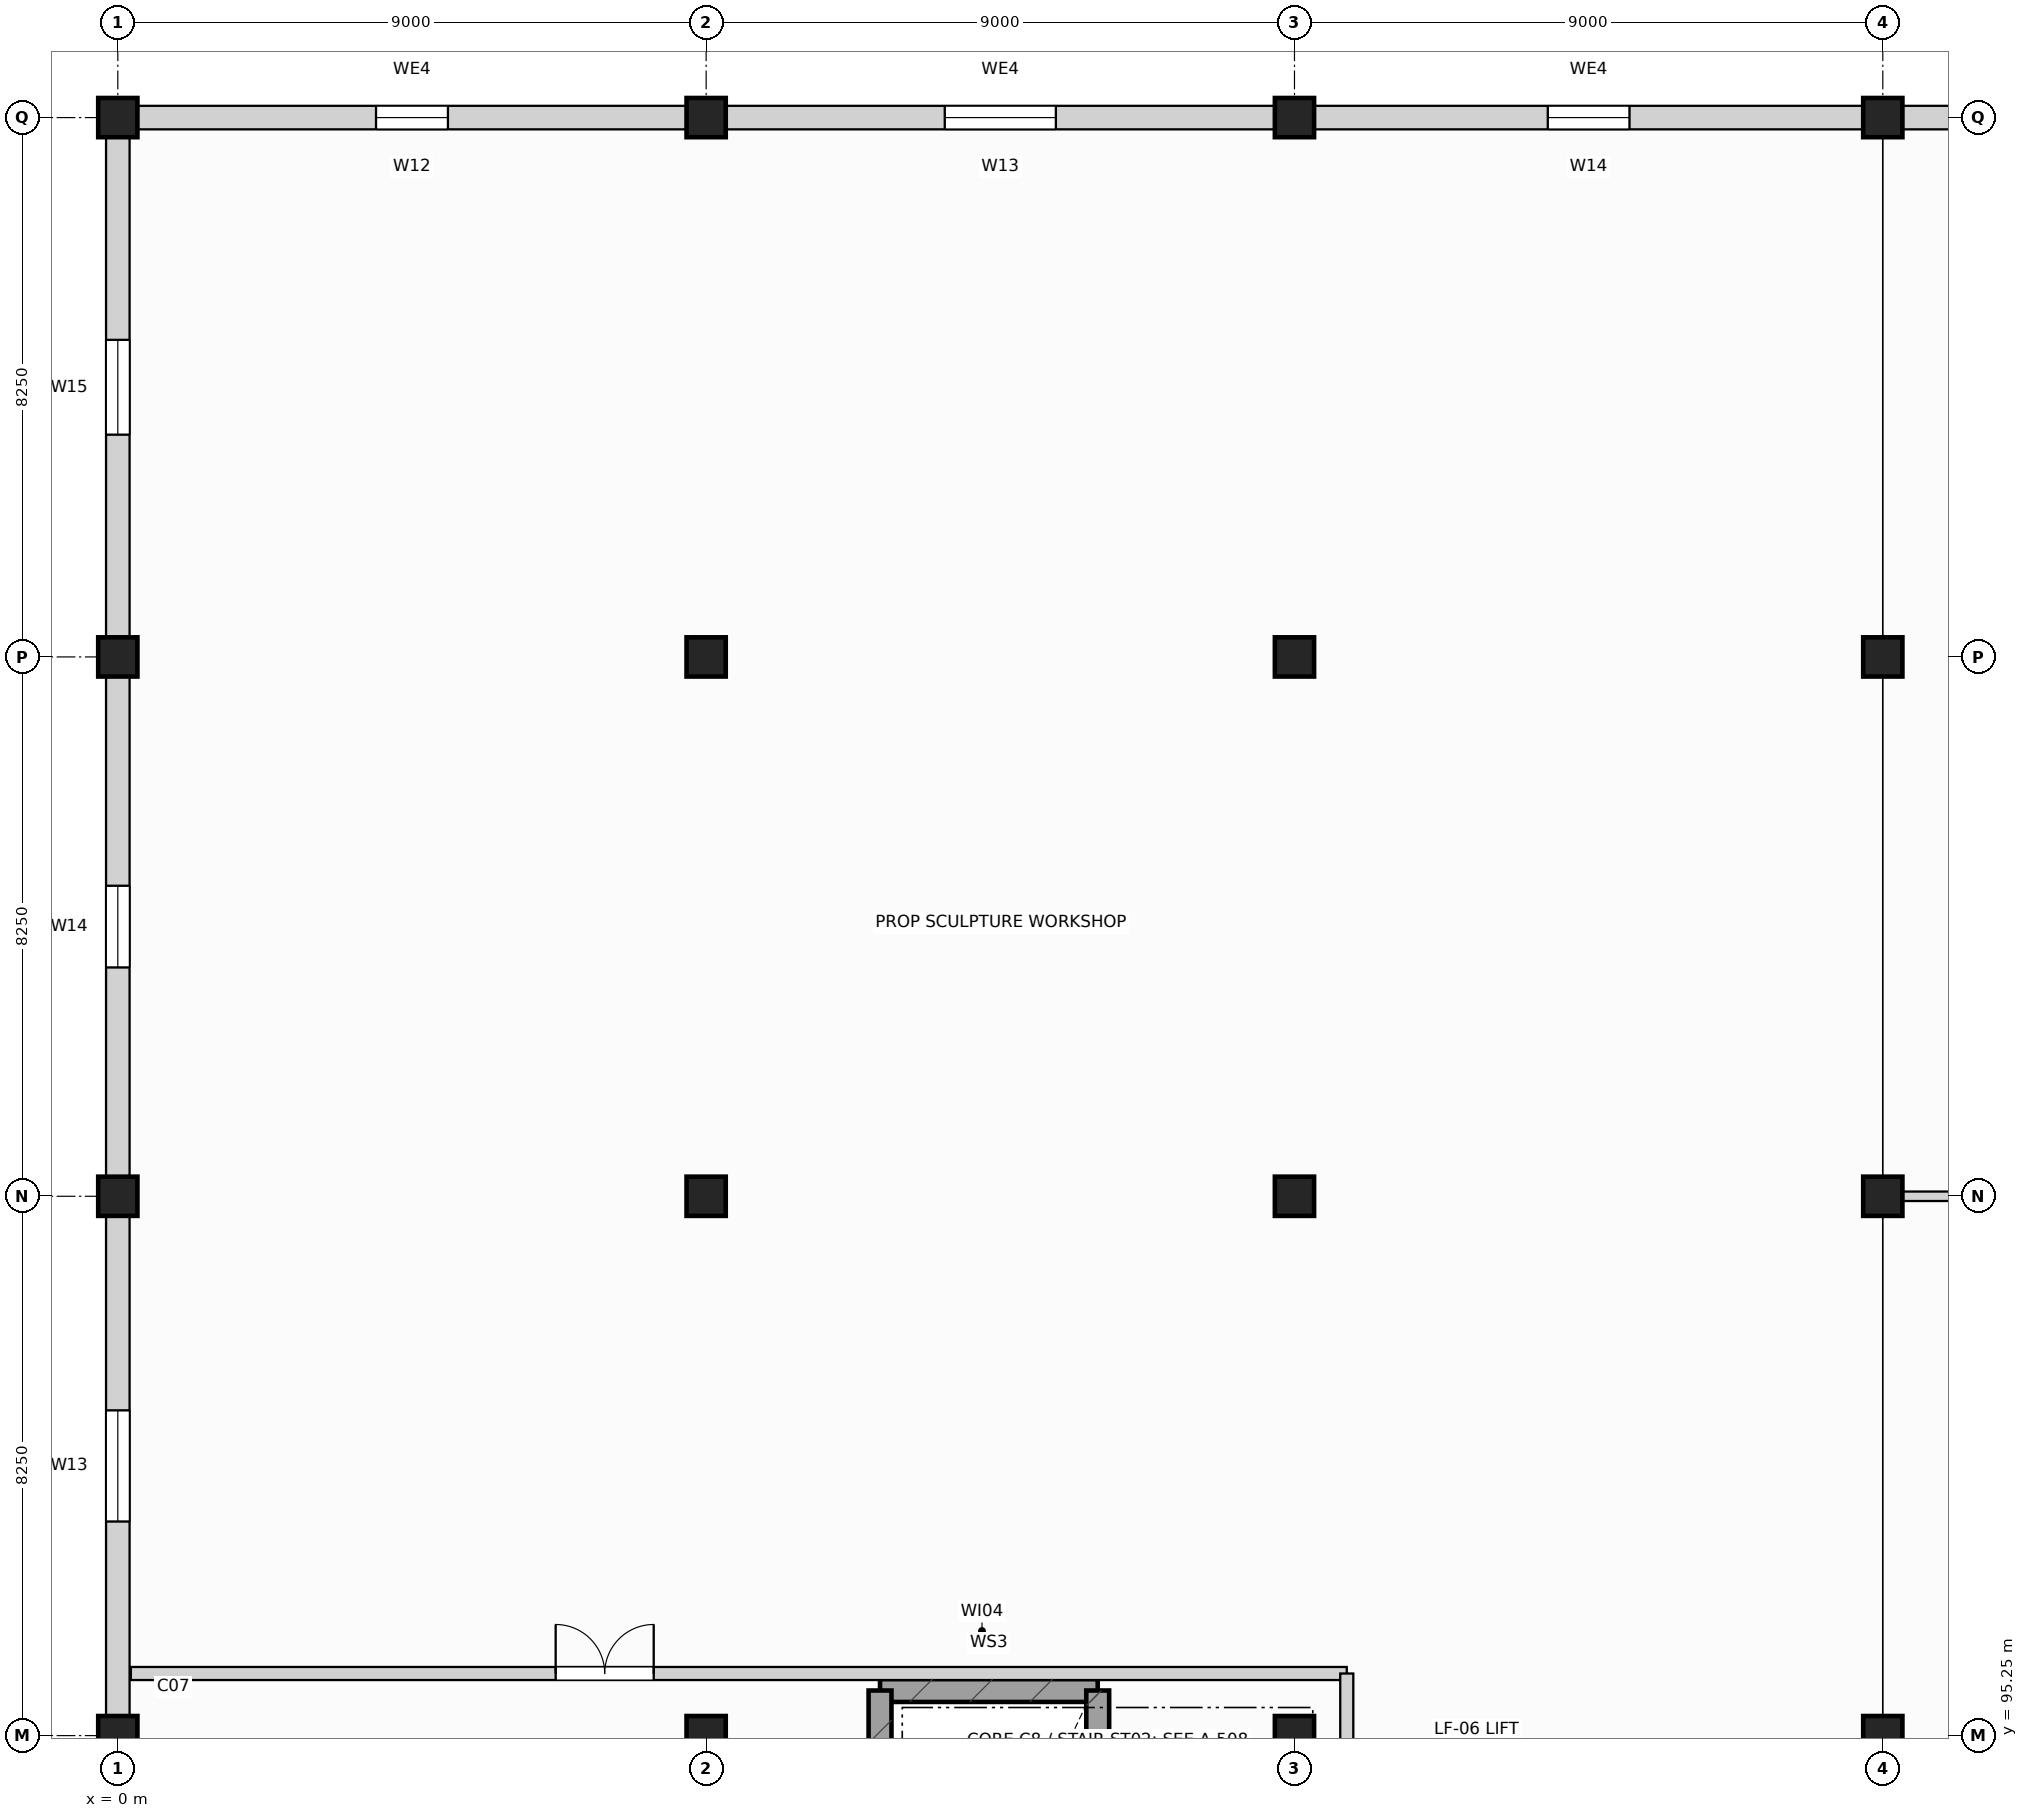
"""IFC4 building model, lengths in metres.
Left out: names, types, materials, properties, quantities, classifications, styles, units other than length and angle.
Written with IfcOpenShell. Run it as: python <this file> out.ifc"""

import sys

from ifc_helpers import new_model, si_unit, direction, frame, frame_2d, origin, origin_2d, place, context, subcontext, project, spatial, rectangle, extrude, element, fill, save


model = new_model("IFC4")
c1 = context("Model", 3, precision=1e-05, world=origin(), true_north=direction((0.0, 1.0)))
c2 = subcontext(c1, "Body", "Model", "MODEL_VIEW")
j1 = project(units=[si_unit("LENGTHUNIT", "METRE"), si_unit("PLANEANGLEUNIT", "RADIAN")], contexts=[c1])
p1 = place(None, origin())
s1 = spatial("IfcSite", under=j1, at=p1, CompositionType="ELEMENT")
p2 = place(p1, origin())
s2 = spatial("IfcBuilding", under=s1, at=p2, CompositionType="ELEMENT")
p3 = place(p2, origin())
s3 = spatial("IfcBuildingStorey", under=s2, at=p3, CompositionType="ELEMENT", Elevation=0.0)
for number, where, z_axis, x_axis in (
    (1, (0.0, 95.25, 0.0), (0.0, 0.0, 1.0), (1.0, 0.0, 0.0)),
    (2, (0.0, 103.5, 0.0), (0.0, 0.0, 1.0), (1.0, 0.0, 0.0)),
    (3, (0.0, 111.75, 0.0), (0.0, 0.0, 1.0), (1.0, 0.0, 0.0)),
    (4, (0.0, 120.0, 0.0), (0.0, 0.0, 1.0), (1.0, 0.0, 0.0)),
    (5, (9.0, 95.25, 0.0), (0.0, 0.0, 1.0), (1.0, 0.0, 0.0)),
    (6, (9.0, 103.5, 0.0), (0.0, 0.0, 1.0), (1.0, 0.0, 0.0)),
    (7, (9.0, 111.75, 0.0), (0.0, 0.0, 1.0), (1.0, 0.0, 0.0)),
    (8, (9.0, 120.0, 0.0), (0.0, 0.0, 1.0), (1.0, 0.0, 0.0)),
    (9, (18.0, 95.25, 0.0), (0.0, 0.0, 1.0), (1.0, 0.0, 0.0)),
    (10, (18.0, 103.5, 0.0), (0.0, 0.0, 1.0), (1.0, 0.0, 0.0)),
    (11, (18.0, 111.75, 0.0), (0.0, 0.0, 1.0), (1.0, 0.0, 0.0)),
    (12, (18.0, 120.0, 0.0), (0.0, 0.0, 1.0), (1.0, 0.0, 0.0)),
    (13, (27.0, 95.25, 0.0), (0.0, 0.0, 1.0), (1.0, 0.0, 0.0)),
    (14, (27.0, 103.5, 0.0), (0.0, 0.0, 1.0), (1.0, 0.0, 0.0)),
    (15, (27.0, 111.75, 0.0), (0.0, 0.0, 1.0), (1.0, 0.0, 0.0)),
    (16, (27.0, 120.0, 0.0), (0.0, 0.0, 1.0), (1.0, 0.0, 0.0)),
):
    element("IfcColumn", number, at=place(p3, frame(where, z_axis=z_axis, x_axis=x_axis)), inside=s3, PredefinedType="COLUMN", context=c2, shape_type="SweptSolid", body=[
        extrude(rectangle(XDim=0.6, YDim=0.6, at=origin_2d()), origin(), (0.0, 0.0, 1.0), 6.0),
    ])
p4 = place(p3, frame((0.295, 120.0, 0.0), z_axis=(0.0, 0.0, 1.0), x_axis=(1.0, 0.0, 0.0)))
e17 = element("IfcWall", 17, at=p4, inside=s3, PredefinedType="SOLIDWALL", context=c2, shape_type="SweptSolid", body=[
    extrude(rectangle(XDim=8.41, YDim=0.36, at=frame_2d((4.205, 0.0))), origin(), (0.0, 0.0, 1.0), 5.115),
])
p5 = place(p4, frame((3.655, 0.0, 0.85)))
e18 = element("IfcOpeningElement", 18, at=p5, cuts=e17, PredefinedType="OPENING", context=c2, shape_type="SweptSolid", body=[
    extrude(rectangle(XDim=1.1, YDim=1.8, at=frame_2d((0.55, 0.9))), frame((0.0, 0.19, 0.0), z_axis=(0.0, -1.0, 0.0), x_axis=(1.0, 0.0, 0.0)), (0.0, 0.0, 1.0), 0.38),
])
p6 = place(p3, frame((9.295, 120.0, 0.0), z_axis=(0.0, 0.0, 1.0), x_axis=(1.0, 0.0, 0.0)))
e19 = element("IfcWall", 19, at=p6, inside=s3, PredefinedType="SOLIDWALL", context=c2, shape_type="SweptSolid", body=[
    extrude(rectangle(XDim=8.41, YDim=0.36, at=frame_2d((4.205, 0.0))), origin(), (0.0, 0.0, 1.0), 5.075),
])
p7 = place(p6, frame((3.355, 0.0, 0.85)))
e20 = element("IfcOpeningElement", 20, at=p7, cuts=e19, PredefinedType="OPENING", context=c2, shape_type="SweptSolid", body=[
    extrude(rectangle(XDim=1.7, YDim=2.15, at=frame_2d((0.85, 1.075))), frame((0.0, 0.19, 0.0), z_axis=(0.0, -1.0, 0.0), x_axis=(1.0, 0.0, 0.0)), (0.0, 0.0, 1.0), 0.38),
])
p8 = place(p3, frame((18.295, 120.0, 0.0), z_axis=(0.0, 0.0, 1.0), x_axis=(1.0, 0.0, 0.0)))
e21 = element("IfcWall", 21, at=p8, inside=s3, PredefinedType="SOLIDWALL", context=c2, shape_type="SweptSolid", body=[
    extrude(rectangle(XDim=8.41, YDim=0.36, at=frame_2d((4.205, 0.0))), origin(), (0.0, 0.0, 1.0), 5.075),
])
p9 = place(p8, frame((3.58, 0.0, 0.85)))
e22 = element("IfcOpeningElement", 22, at=p9, cuts=e21, PredefinedType="OPENING", context=c2, shape_type="SweptSolid", body=[
    extrude(rectangle(XDim=1.25, YDim=1.85, at=frame_2d((0.625, 0.925))), frame((0.0, 0.19, 0.0), z_axis=(0.0, -1.0, 0.0), x_axis=(1.0, 0.0, 0.0)), (0.0, 0.0, 1.0), 0.38),
])
p10 = place(p3, frame((27.295, 120.0, 0.0), z_axis=(0.0, 0.0, 1.0), x_axis=(1.0, 0.0, 0.0)))
e23 = element("IfcWall", 23, at=p10, inside=s3, PredefinedType="SOLIDWALL", context=c2, shape_type="SweptSolid", body=[
    extrude(rectangle(XDim=8.41, YDim=0.36, at=frame_2d((4.205, 0.0))), origin(), (0.0, 0.0, 1.0), 5.015),
])
p11 = place(p10, frame((3.48, 0.0, 0.85)))
e24 = element("IfcOpeningElement", 24, at=p11, cuts=e23, PredefinedType="OPENING", context=c2, shape_type="SweptSolid", body=[
    extrude(rectangle(XDim=1.45, YDim=1.95, at=frame_2d((0.725, 0.975))), frame((0.0, 0.19, 0.0), z_axis=(0.0, -1.0, 0.0), x_axis=(1.0, 0.0, 0.0)), (0.0, 0.0, 1.0), 0.38),
])
p12 = place(p3, frame((0.0, 103.205, 0.0), z_axis=(0.0, 0.0, 1.0), x_axis=(0.0, -1.0, 0.0)))
e25 = element("IfcWall", 25, at=p12, inside=s3, PredefinedType="SOLIDWALL", context=c2, shape_type="SweptSolid", body=[
    extrude(rectangle(XDim=7.66, YDim=0.36, at=frame_2d((3.83, 0.0))), origin(), (0.0, 0.0, 1.0), 4.965),
])
p13 = place(p12, frame((2.98, 0.0, 0.85)))
e26 = element("IfcOpeningElement", 26, at=p13, cuts=e25, PredefinedType="OPENING", context=c2, shape_type="SweptSolid", body=[
    extrude(rectangle(XDim=1.7, YDim=2.15, at=frame_2d((0.85, 1.075))), frame((0.0, 0.19, 0.0), z_axis=(0.0, -1.0, 0.0), x_axis=(1.0, 0.0, 0.0)), (0.0, 0.0, 1.0), 0.38),
])
p14 = place(p3, frame((0.0, 111.455, 0.0), z_axis=(0.0, 0.0, 1.0), x_axis=(0.0, -1.0, 0.0)))
e27 = element("IfcWall", 27, at=p14, inside=s3, PredefinedType="SOLIDWALL", context=c2, shape_type="SweptSolid", body=[
    extrude(rectangle(XDim=7.66, YDim=0.36, at=frame_2d((3.83, 0.0))), origin(), (0.0, 0.0, 1.0), 5.065),
])
p15 = place(p14, frame((3.205, 0.0, 0.85)))
e28 = element("IfcOpeningElement", 28, at=p15, cuts=e27, PredefinedType="OPENING", context=c2, shape_type="SweptSolid", body=[
    extrude(rectangle(XDim=1.25, YDim=1.85, at=frame_2d((0.625, 0.925))), frame((0.0, 0.19, 0.0), z_axis=(0.0, -1.0, 0.0), x_axis=(1.0, 0.0, 0.0)), (0.0, 0.0, 1.0), 0.38),
])
p16 = place(p3, frame((0.0, 119.705, 0.0), z_axis=(0.0, 0.0, 1.0), x_axis=(0.0, -1.0, 0.0)))
e29 = element("IfcWall", 29, at=p16, inside=s3, PredefinedType="SOLIDWALL", context=c2, shape_type="SweptSolid", body=[
    extrude(rectangle(XDim=7.66, YDim=0.36, at=frame_2d((3.83, 0.0))), origin(), (0.0, 0.0, 1.0), 5.075),
])
p17 = place(p16, frame((3.105, 0.0, 0.85)))
e30 = element("IfcOpeningElement", 30, at=p17, cuts=e29, PredefinedType="OPENING", context=c2, shape_type="SweptSolid", body=[
    extrude(rectangle(XDim=1.45, YDim=1.95, at=frame_2d((0.725, 0.975))), frame((0.0, 0.19, 0.0), z_axis=(0.0, -1.0, 0.0), x_axis=(1.0, 0.0, 0.0)), (0.0, 0.0, 1.0), 0.38),
])
p18 = place(p3, frame((11.66, 95.94, 0.0), z_axis=(0.0, 0.0, 1.0), x_axis=(1.0, 0.0, 0.0)))
e31 = element("IfcWall", 31, at=p18, inside=s3, PredefinedType="SHEAR", context=c2, shape_type="SweptSolid", body=[
    extrude(rectangle(XDim=3.33, YDim=0.35, at=frame_2d((1.665, 0.0))), origin(), (0.0, 0.0, 1.0), 5.7),
])
p19 = place(p3, frame((11.66, 87.71, 0.0), z_axis=(0.0, 0.0, 1.0), x_axis=(0.0, 1.0, 0.0)))
e32 = element("IfcWall", 32, at=p19, inside=s3, PredefinedType="SHEAR", context=c2, shape_type="SweptSolid", body=[
    extrude(rectangle(XDim=8.23, YDim=0.35, at=frame_2d((4.115, 0.0))), origin(), (0.0, 0.0, 1.0), 5.7),
])
p20 = place(p3, frame((14.99, 87.71, 0.0), z_axis=(0.0, 0.0, 1.0), x_axis=(0.0, 1.0, 0.0)))
e33 = element("IfcWall", 33, at=p20, inside=s3, PredefinedType="SHEAR", context=c2, shape_type="SweptSolid", body=[
    extrude(rectangle(XDim=8.23, YDim=0.35, at=frame_2d((4.115, 0.0))), origin(), (0.0, 0.0, 1.0), 5.7),
])
p21 = place(p20, frame((0.24, 0.0, 0.0)))
e34 = element("IfcOpeningElement", 34, at=p21, cuts=e33, PredefinedType="OPENING", context=c2, shape_type="SweptSolid", body=[
    extrude(rectangle(XDim=1.05, YDim=2.18, at=frame_2d((0.525, 1.09))), frame((0.0, 0.185, 0.0), z_axis=(0.0, -1.0, 0.0), x_axis=(1.0, 0.0, 0.0)), (0.0, 0.0, 1.0), 0.37),
])
p22 = place(p3, frame((0.2, 96.2, 0.0), z_axis=(0.0, 0.0, 1.0), x_axis=(1.0, 0.0, 0.0)))
e35 = element("IfcWall", 35, at=p22, inside=s3, PredefinedType="PARTITIONING", context=c2, shape_type="SweptSolid", body=[
    extrude(rectangle(XDim=18.6, YDim=0.2, at=frame_2d((9.3, 0.0))), origin(), (0.0, 0.0, 1.0), 5.015),
])
p23 = place(p22, frame((6.498, 0.0, 0.0)))
e36 = element("IfcOpeningElement", 36, at=p23, cuts=e35, PredefinedType="OPENING", context=c2, shape_type="SweptSolid", body=[
    extrude(rectangle(XDim=1.5, YDim=2.2, at=frame_2d((0.75, 1.1))), frame((0.0, 0.11, 0.0), z_axis=(0.0, -1.0, 0.0), x_axis=(1.0, 0.0, 0.0)), (0.0, 0.0, 1.0), 0.22),
])
p24 = place(p3, frame((18.8, 87.0, 0.0), z_axis=(0.0, 0.0, 1.0), x_axis=(0.0, 1.0, 0.0)))
e37 = element("IfcWall", 37, at=p24, inside=s3, PredefinedType="PARTITIONING", context=c2, shape_type="SweptSolid", body=[
    extrude(rectangle(XDim=9.2, YDim=0.2, at=frame_2d((4.6, 0.0))), origin(), (0.0, 0.0, 1.0), 5.015),
])
p25 = place(p24, frame((4.1, 0.0, 0.0)))
e38 = element("IfcOpeningElement", 38, at=p25, cuts=e37, PredefinedType="OPENING", context=c2, shape_type="SweptSolid", body=[
    extrude(rectangle(XDim=1.0, YDim=2.12, at=frame_2d((0.5, 1.06))), frame((0.0, 0.11, 0.0), z_axis=(0.0, -1.0, 0.0), x_axis=(1.0, 0.0, 0.0)), (0.0, 0.0, 1.0), 0.22),
])
p26 = place(p3, frame((27.0, 103.5, 0.0), z_axis=(0.0, 0.0, 1.0), x_axis=(1.0, 0.0, 0.0)))
e39 = element("IfcWall", 39, at=p26, inside=s3, PredefinedType="PARTITIONING", context=c2, shape_type="SweptSolid", body=[
    extrude(rectangle(XDim=53.8, YDim=0.145, at=frame_2d((26.9, 0.0))), origin(), (0.0, 0.0, 1.0), 4.715),
])
p27 = place(p26, frame((20.064, 0.0, 0.0)))
e40 = element("IfcOpeningElement", 40, at=p27, cuts=e39, PredefinedType="OPENING", context=c2, shape_type="SweptSolid", body=[
    extrude(rectangle(XDim=1.0, YDim=2.12, at=frame_2d((0.5, 1.06))), frame((0.0, 0.083, 0.0), z_axis=(0.0, -1.0, 0.0), x_axis=(1.0, 0.0, 0.0)), (0.0, 0.0, 1.0), 0.165),
])
p28 = place(p5, origin())
e41 = element("IfcWindow", 41, at=p28, inside=s3, PartitioningType="SINGLE_PANEL", PredefinedType="WINDOW", context=c2, shape_type="SweptSolid", body=[
    extrude(rectangle(XDim=1.1, YDim=1.8, at=frame_2d((0.55, 0.9))), frame((0.0, 0.03, 0.0), z_axis=(0.0, -1.0, 0.0), x_axis=(1.0, 0.0, 0.0)), (0.0, 0.0, 1.0), 0.06),
])
fill(e18, e41)
p29 = place(p7, origin())
e42 = element("IfcWindow", 42, at=p29, inside=s3, PartitioningType="SINGLE_PANEL", PredefinedType="WINDOW", context=c2, shape_type="SweptSolid", body=[
    extrude(rectangle(XDim=1.7, YDim=2.15, at=frame_2d((0.85, 1.075))), frame((0.0, 0.03, 0.0), z_axis=(0.0, -1.0, 0.0), x_axis=(1.0, 0.0, 0.0)), (0.0, 0.0, 1.0), 0.06),
])
fill(e20, e42)
p30 = place(p9, origin())
e43 = element("IfcWindow", 43, at=p30, inside=s3, PartitioningType="SINGLE_PANEL", PredefinedType="WINDOW", context=c2, shape_type="SweptSolid", body=[
    extrude(rectangle(XDim=1.25, YDim=1.85, at=frame_2d((0.625, 0.925))), frame((0.0, 0.03, 0.0), z_axis=(0.0, -1.0, 0.0), x_axis=(1.0, 0.0, 0.0)), (0.0, 0.0, 1.0), 0.06),
])
fill(e22, e43)
p31 = place(p13, origin())
e44 = element("IfcWindow", 44, at=p31, inside=s3, PartitioningType="SINGLE_PANEL", PredefinedType="WINDOW", context=c2, shape_type="SweptSolid", body=[
    extrude(rectangle(XDim=1.7, YDim=2.15, at=frame_2d((0.85, 1.075))), frame((0.0, 0.03, 0.0), z_axis=(0.0, -1.0, 0.0), x_axis=(1.0, 0.0, 0.0)), (0.0, 0.0, 1.0), 0.06),
])
fill(e26, e44)
p32 = place(p15, origin())
e45 = element("IfcWindow", 45, at=p32, inside=s3, PartitioningType="SINGLE_PANEL", PredefinedType="WINDOW", context=c2, shape_type="SweptSolid", body=[
    extrude(rectangle(XDim=1.25, YDim=1.85, at=frame_2d((0.625, 0.925))), frame((0.0, 0.03, 0.0), z_axis=(0.0, -1.0, 0.0), x_axis=(1.0, 0.0, 0.0)), (0.0, 0.0, 1.0), 0.06),
])
fill(e28, e45)
p33 = place(p17, origin())
e46 = element("IfcWindow", 46, at=p33, inside=s3, PartitioningType="SINGLE_PANEL", PredefinedType="WINDOW", context=c2, shape_type="SweptSolid", body=[
    extrude(rectangle(XDim=1.45, YDim=1.95, at=frame_2d((0.725, 0.975))), frame((0.0, 0.03, 0.0), z_axis=(0.0, -1.0, 0.0), x_axis=(1.0, 0.0, 0.0)), (0.0, 0.0, 1.0), 0.06),
])
fill(e30, e46)
p34 = place(p23, origin())
e47 = element("IfcDoor", 47, at=p34, inside=s3, OperationType="DOUBLE_DOOR_SINGLE_SWING", PredefinedType="DOOR", context=c2, shape_type="SweptSolid", body=[
    extrude(rectangle(XDim=1.5, YDim=2.2, at=frame_2d((0.75, 1.1))), frame((0.0, 0.025, 0.0), z_axis=(0.0, -1.0, 0.0), x_axis=(1.0, 0.0, 0.0)), (0.0, 0.0, 1.0), 0.05),
])
fill(e36, e47)
save(model, sys.argv[1])
